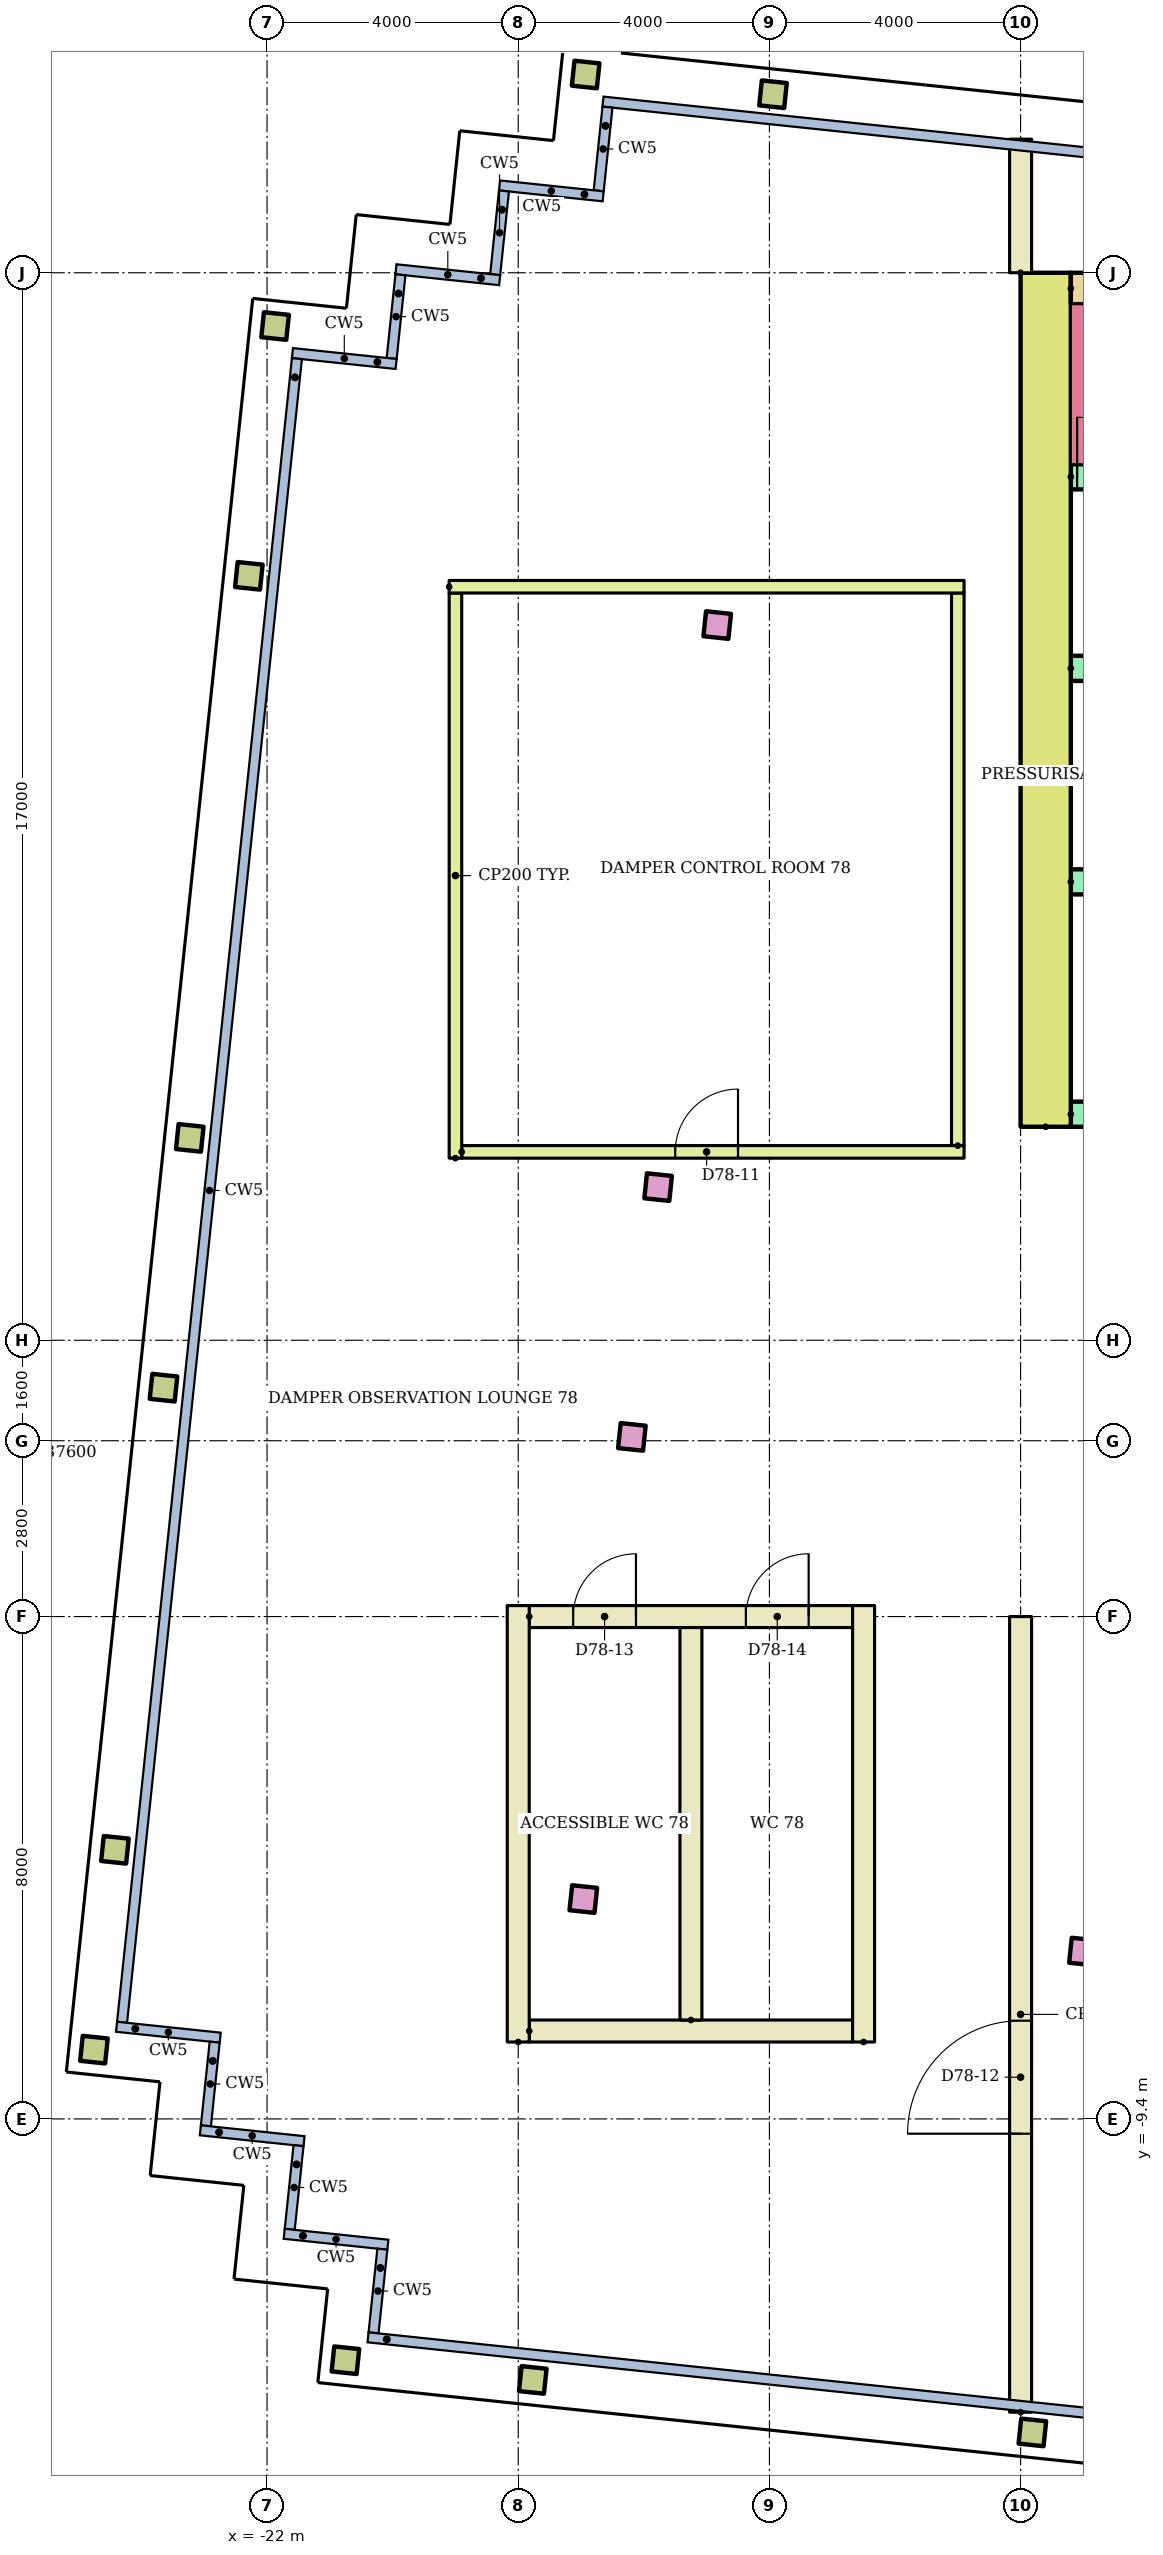
"""IFC4 building model, lengths in metres.
Left out: names, types, materials, properties, quantities, classifications, styles, units other than length and angle.
Written with IfcOpenShell. Run it as: python <this file> out.ifc"""

import sys

from ifc_helpers import new_model, si_unit, direction, frame, frame_2d, origin, origin_2d, place, context, subcontext, project, spatial, rectangle, hollow_rectangle, extrude, element, fill, save


model = new_model("IFC4")
c1 = context("Model", 3, precision=1e-05, world=origin(), true_north=direction((0.0, 1.0)))
c2 = subcontext(c1, "Body", "Model", "MODEL_VIEW")
j1 = project(units=[si_unit("LENGTHUNIT", "METRE"), si_unit("PLANEANGLEUNIT", "RADIAN")], contexts=[c1])
p1 = place(None, origin())
s1 = spatial("IfcSite", under=j1, at=p1, CompositionType="ELEMENT")
p2 = place(p1, origin())
s2 = spatial("IfcBuilding", under=s1, at=p2, CompositionType="ELEMENT")
p3 = place(p2, frame((0.0, 0.0, 301.7)))
s3 = spatial("IfcBuildingStorey", under=s2, at=p3, CompositionType="ELEMENT", Elevation=301.7)
for number, where, z_axis, x_axis in (
    (1, (-20.752, -13.243, 0.0), (0.0, 0.0, 1.0), (0.995, -0.105, 0.0)),
    (2, (-17.768, -13.556, 0.0), (0.0, 0.0, 1.0), (0.995, -0.105, 0.0)),
    (3, (-9.812, -14.392, 0.0), (0.0, 0.0, 1.0), (0.995, -0.105, 0.0)),
    (4, (-24.757, -8.297, 0.0), (0.0, 0.0, 1.0), (0.995, -0.105, 0.0)),
    (5, (-24.423, -5.115, 0.0), (0.0, 0.0, 1.0), (0.995, -0.105, 0.0)),
):
    element("IfcColumn", number, at=place(p3, frame(where, z_axis=z_axis, x_axis=x_axis)), inside=s3, PredefinedType="COLUMN", context=c2, shape_type="SweptSolid", body=[
        extrude(hollow_rectangle(XDim=0.4, YDim=0.4, WallThickness=0.02, at=origin_2d()), origin(), (0.0, 0.0, 1.0), 7.5),
    ])
for number, where, z_axis, x_axis in (
    (6, (-16.964, -5.898, 0.0), (0.0, 0.0, 1.0), (0.995, -0.105, 0.0)),
    (7, (-9.007, -6.735, 0.0), (0.0, 0.0, 1.0), (0.995, -0.105, 0.0)),
):
    element("IfcColumn", number, at=place(p3, frame(where, z_axis=z_axis, x_axis=x_axis)), inside=s3, PredefinedType="COLUMN", context=c2, shape_type="SweptSolid", body=[
        extrude(rectangle(XDim=0.4, YDim=0.4, at=origin_2d()), origin(), (0.0, 0.0, 1.0), 7.5),
    ])
p4 = place(p3, frame((-23.649, 2.245, 0.0), z_axis=(0.0, 0.0, 1.0), x_axis=(0.994521895368, -0.104528463268, 0.0)))
e8 = element("IfcColumn", 8, at=p4, inside=s3, PredefinedType="COLUMN", context=c2, shape_type="SweptSolid", body=[
    extrude(hollow_rectangle(XDim=0.4, YDim=0.4, WallThickness=0.02, at=origin_2d()), origin(), (0.0, 0.0, 1.0), 7.5),
])
p5 = place(p3, frame((-16.19, 1.461, 0.0), z_axis=(0.0, 0.0, 1.0), x_axis=(0.994521895368, -0.104528463268, 0.0)))
e9 = element("IfcColumn", 9, at=p5, inside=s3, PredefinedType="COLUMN", context=c2, shape_type="SweptSolid", body=[
    extrude(rectangle(XDim=0.4, YDim=0.4, at=origin_2d()), origin(), (0.0, 0.0, 1.0), 7.5),
])
p6 = place(p3, frame((-23.231, 6.223, 0.0), z_axis=(0.0, 0.0, 1.0), x_axis=(0.994521895368, -0.104528463268, 0.0)))
e10 = element("IfcColumn", 10, at=p6, inside=s3, PredefinedType="COLUMN", context=c2, shape_type="SweptSolid", body=[
    extrude(hollow_rectangle(XDim=0.4, YDim=0.4, WallThickness=0.02, at=origin_2d()), origin(), (0.0, 0.0, 1.0), 7.5),
])
p7 = place(p3, frame((-15.772, 5.439, 0.0), z_axis=(0.0, 0.0, 1.0), x_axis=(0.994521895368, -0.104528463268, 0.0)))
e11 = element("IfcColumn", 11, at=p7, inside=s3, PredefinedType="COLUMN", context=c2, shape_type="SweptSolid", body=[
    extrude(rectangle(XDim=0.4, YDim=0.4, at=origin_2d()), origin(), (0.0, 0.0, 1.0), 7.5),
])
p8 = place(p3, frame((-22.29, 15.174, 0.0), z_axis=(0.0, 0.0, 1.0), x_axis=(0.994521895368, -0.104528463268, 0.0)))
e12 = element("IfcColumn", 12, at=p8, inside=s3, PredefinedType="COLUMN", context=c2, shape_type="SweptSolid", body=[
    extrude(hollow_rectangle(XDim=0.4, YDim=0.4, WallThickness=0.02, at=origin_2d()), origin(), (0.0, 0.0, 1.0), 7.5),
])
p9 = place(p3, frame((-14.831, 14.39, 0.0), z_axis=(0.0, 0.0, 1.0), x_axis=(0.994521895368, -0.104528463268, 0.0)))
e13 = element("IfcColumn", 13, at=p9, inside=s3, PredefinedType="COLUMN", context=c2, shape_type="SweptSolid", body=[
    extrude(rectangle(XDim=0.4, YDim=0.4, at=origin_2d()), origin(), (0.0, 0.0, 1.0), 7.5),
])
for number, where, z_axis, x_axis in (
    (14, (-21.872, 19.152, 0.0), (0.0, 0.0, 1.0), (0.995, -0.105, 0.0)),
    (15, (-16.926, 23.157, 0.0), (0.0, 0.0, 1.0), (0.995, -0.105, 0.0)),
    (16, (-13.943, 22.843, 0.0), (0.0, 0.0, 1.0), (0.995, -0.105, 0.0)),
):
    element("IfcColumn", number, at=place(p3, frame(where, z_axis=z_axis, x_axis=x_axis)), inside=s3, PredefinedType="COLUMN", context=c2, shape_type="SweptSolid", body=[
        extrude(hollow_rectangle(XDim=0.4, YDim=0.4, WallThickness=0.02, at=origin_2d()), origin(), (0.0, 0.0, 1.0), 7.5),
    ])
p10 = place(p3, frame((-9.6, 6.4, 0.0), z_axis=(0.0, 0.0, 1.0), x_axis=(0.0, 1.0, 0.0)))
e17 = element("IfcWall", 17, at=p10, inside=s3, PredefinedType="SHEAR", context=c2, shape_type="SweptSolid", body=[
    extrude(rectangle(XDim=13.6, YDim=0.8, at=frame_2d((6.8, 0.0))), origin(), (0.0, 0.0, 1.0), 7.08),
])
p11 = place(p3, frame((-9.2, 19.75, 0.0)))
e18 = element("IfcWall", 18, at=p11, inside=s3, PredefinedType="SHEAR", context=c2, shape_type="SweptSolid", body=[
    extrude(rectangle(XDim=18.4, YDim=0.5, at=frame_2d((9.2, 0.0))), origin(), (0.0, 0.0, 1.0), 7.08),
])
p12 = place(p3, frame((-9.2, 6.6, 0.0)))
e19 = element("IfcWall", 19, at=p12, inside=s3, PredefinedType="SHEAR", context=c2, shape_type="SweptSolid", body=[
    extrude(rectangle(XDim=18.4, YDim=0.4, at=frame_2d((9.2, 0.0))), origin(), (0.0, 0.0, 1.0), 7.08),
])
p13 = place(p12, frame((8.3, 0.0, 0.0)))
e20 = element("IfcOpeningElement", 20, at=p13, cuts=e19, PredefinedType="OPENING", context=c2, shape_type="SweptSolid", body=[
    extrude(rectangle(XDim=1.8, YDim=2.1, at=frame_2d((0.9, 1.05))), frame((0.0, 0.21, 0.0), z_axis=(0.0, -1.0, 0.0), x_axis=(1.0, 0.0, 0.0)), (0.0, 0.0, 1.0), 0.42),
])
p14 = place(p12, frame((3.8, 0.0, 0.0)))
e21 = element("IfcOpeningElement", 21, at=p14, cuts=e19, PredefinedType="OPENING", context=c2, shape_type="SweptSolid", body=[
    extrude(rectangle(XDim=1.8, YDim=2.1, at=frame_2d((0.9, 1.05))), frame((0.0, 0.21, 0.0), z_axis=(0.0, -1.0, 0.0), x_axis=(1.0, 0.0, 0.0)), (0.0, 0.0, 1.0), 0.42),
])
p15 = place(p12, frame((12.8, 0.0, 0.0)))
e22 = element("IfcOpeningElement", 22, at=p15, cuts=e19, PredefinedType="OPENING", context=c2, shape_type="SweptSolid", body=[
    extrude(rectangle(XDim=1.8, YDim=2.1, at=frame_2d((0.9, 1.05))), frame((0.0, 0.21, 0.0), z_axis=(0.0, -1.0, 0.0), x_axis=(1.0, 0.0, 0.0)), (0.0, 0.0, 1.0), 0.42),
])
p16 = place(p3, frame((-9.2, 10.3, 0.0)))
e23 = element("IfcWall", 23, at=p16, inside=s3, PredefinedType="SHEAR", context=c2, shape_type="SweptSolid", body=[
    extrude(rectangle(XDim=8.0, YDim=0.4, at=frame_2d((4.0, 0.0))), origin(), (0.0, 0.0, 1.0), 7.08),
])
p17 = place(p16, frame((0.917, 0.0, 0.0)))
e24 = element("IfcOpeningElement", 24, at=p17, cuts=e23, PredefinedType="OPENING", context=c2, shape_type="SweptSolid", body=[
    extrude(rectangle(XDim=1.0, YDim=2.1, at=frame_2d((0.5, 1.05))), frame((0.0, 0.21, 0.0), z_axis=(0.0, -1.0, 0.0), x_axis=(1.0, 0.0, 0.0)), (0.0, 0.0, 1.0), 0.42),
])
p18 = place(p3, frame((-9.2, 13.7, 0.0)))
e25 = element("IfcWall", 25, at=p18, inside=s3, PredefinedType="SHEAR", context=c2, shape_type="SweptSolid", body=[
    extrude(rectangle(XDim=8.0, YDim=0.4, at=frame_2d((4.0, 0.0))), origin(), (0.0, 0.0, 1.0), 7.08),
])
p19 = place(p3, frame((-9.2, 16.75, 0.0)))
e26 = element("IfcWall", 26, at=p19, inside=s3, PredefinedType="SHEAR", context=c2, shape_type="SweptSolid", body=[
    extrude(rectangle(XDim=18.4, YDim=0.4, at=frame_2d((9.2, 0.0))), origin(), (0.0, 0.0, 1.0), 7.08),
])
p20 = place(p19, frame((0.1, 0.0, 0.0)))
e27 = element("IfcOpeningElement", 27, at=p20, cuts=e26, PredefinedType="OPENING", context=c2, shape_type="SweptSolid", body=[
    extrude(rectangle(XDim=0.95, YDim=2.1, at=frame_2d((0.475, 1.05))), frame((0.0, 0.21, 0.0), z_axis=(0.0, -1.0, 0.0), x_axis=(1.0, 0.0, 0.0)), (0.0, 0.0, 1.0), 0.42),
])
p21 = place(p19, frame((6.1, 0.0, 0.0)))
e28 = element("IfcOpeningElement", 28, at=p21, cuts=e26, PredefinedType="OPENING", context=c2, shape_type="SweptSolid", body=[
    extrude(rectangle(XDim=0.95, YDim=2.1, at=frame_2d((0.475, 1.05))), frame((0.0, 0.21, 0.0), z_axis=(0.0, -1.0, 0.0), x_axis=(1.0, 0.0, 0.0)), (0.0, 0.0, 1.0), 0.42),
])
p22 = place(p19, frame((12.1, 0.0, 0.0)))
e29 = element("IfcOpeningElement", 29, at=p22, cuts=e26, PredefinedType="OPENING", context=c2, shape_type="SweptSolid", body=[
    extrude(rectangle(XDim=0.95, YDim=2.1, at=frame_2d((0.475, 1.05))), frame((0.0, 0.21, 0.0), z_axis=(0.0, -1.0, 0.0), x_axis=(1.0, 0.0, 0.0)), (0.0, 0.0, 1.0), 0.42),
])
p23 = place(p3, frame((-11.0, 6.1, 0.0), z_axis=(0.0, 0.0, 1.0), x_axis=(0.0, 1.0, 0.0)))
e30 = element("IfcWall", 30, at=p23, inside=s3, PredefinedType="PARTITIONING", context=c2, shape_type="SweptSolid", body=[
    extrude(rectangle(XDim=8.8, YDim=0.2, at=frame_2d((4.4, 0.0))), origin(), (0.0, 0.0, 1.0), 7.08),
])
p24 = place(p3, frame((-18.9, 6.0, 0.0)))
e31 = element("IfcWall", 31, at=p24, inside=s3, PredefinedType="PARTITIONING", context=c2, shape_type="SweptSolid", body=[
    extrude(rectangle(XDim=8.0, YDim=0.2, at=frame_2d((4.0, 0.0))), origin(), (0.0, 0.0, 1.0), 7.08),
])
p25 = place(p24, frame((3.4, 0.0, 0.0)))
e32 = element("IfcOpeningElement", 32, at=p25, cuts=e31, PredefinedType="OPENING", context=c2, shape_type="SweptSolid", body=[
    extrude(rectangle(XDim=1.0, YDim=2.1, at=frame_2d((0.5, 1.05))), frame((0.0, 0.11, 0.0), z_axis=(0.0, -1.0, 0.0), x_axis=(1.0, 0.0, 0.0)), (0.0, 0.0, 1.0), 0.22),
])
p26 = place(p3, frame((-19.0, 5.9, 0.0), z_axis=(0.0, 0.0, 1.0), x_axis=(0.0, 1.0, 0.0)))
e33 = element("IfcWall", 33, at=p26, inside=s3, PredefinedType="PARTITIONING", context=c2, shape_type="SweptSolid", body=[
    extrude(rectangle(XDim=9.0, YDim=0.2, at=frame_2d((4.5, 0.0))), origin(), (0.0, 0.0, 1.0), 7.08),
])
p27 = place(p3, frame((-19.1, 15.0, 0.0)))
e34 = element("IfcWall", 34, at=p27, inside=s3, PredefinedType="PARTITIONING", context=c2, shape_type="SweptSolid", body=[
    extrude(rectangle(XDim=8.2, YDim=0.2, at=frame_2d((4.1, 0.0))), origin(), (0.0, 0.0, 1.0), 7.08),
])
p28 = place(p3, frame((-10.0, -14.071, 0.0), z_axis=(0.0, 0.0, 1.0), x_axis=(0.0, 1.0, 0.0)))
e35 = element("IfcWall", 35, at=p28, inside=s3, PredefinedType="PARTITIONING", context=c2, shape_type="SweptSolid", body=[
    extrude(rectangle(XDim=12.671, YDim=0.35, at=frame_2d((6.335, 0.0))), origin(), (0.0, 0.0, 1.0), 7.08),
])
p29 = place(p28, frame((4.436, 0.0, 0.0)))
e36 = element("IfcOpeningElement", 36, at=p29, cuts=e35, PredefinedType="OPENING", context=c2, shape_type="SweptSolid", body=[
    extrude(rectangle(XDim=1.8, YDim=2.1, at=frame_2d((0.9, 1.05))), frame((0.0, 0.185, 0.0), z_axis=(0.0, -1.0, 0.0), x_axis=(1.0, 0.0, 0.0)), (0.0, 0.0, 1.0), 0.37),
])
p30 = place(p3, frame((-10.0, 20.0, 0.0), z_axis=(0.0, 0.0, 1.0), x_axis=(0.0, 1.0, 0.0)))
e37 = element("IfcWall", 37, at=p30, inside=s3, PredefinedType="PARTITIONING", context=c2, shape_type="SweptSolid", body=[
    extrude(rectangle(XDim=2.127, YDim=0.35, at=frame_2d((1.063, 0.0))), origin(), (0.0, 0.0, 1.0), 7.08),
])
p31 = place(p3, frame((-17.825, -1.4, 0.0)))
e38 = element("IfcWall", 38, at=p31, inside=s3, PredefinedType="PARTITIONING", context=c2, shape_type="SweptSolid", body=[
    extrude(rectangle(XDim=5.15, YDim=0.35, at=frame_2d((2.575, 0.0))), origin(), (0.0, 0.0, 1.0), 7.08),
])
p32 = place(p31, frame((0.7, 0.0, 0.0)))
e39 = element("IfcOpeningElement", 39, at=p32, cuts=e38, PredefinedType="OPENING", context=c2, shape_type="SweptSolid", body=[
    extrude(rectangle(XDim=1.0, YDim=2.1, at=frame_2d((0.5, 1.05))), frame((0.0, 0.185, 0.0), z_axis=(0.0, -1.0, 0.0), x_axis=(1.0, 0.0, 0.0)), (0.0, 0.0, 1.0), 0.37),
])
p33 = place(p31, frame((3.45, 0.0, 0.0)))
e40 = element("IfcOpeningElement", 40, at=p33, cuts=e38, PredefinedType="OPENING", context=c2, shape_type="SweptSolid", body=[
    extrude(rectangle(XDim=1.0, YDim=2.1, at=frame_2d((0.5, 1.05))), frame((0.0, 0.185, 0.0), z_axis=(0.0, -1.0, 0.0), x_axis=(1.0, 0.0, 0.0)), (0.0, 0.0, 1.0), 0.37),
])
p34 = place(p3, frame((-17.825, -8.0, 0.0)))
e41 = element("IfcWall", 41, at=p34, inside=s3, PredefinedType="PARTITIONING", context=c2, shape_type="SweptSolid", body=[
    extrude(rectangle(XDim=5.15, YDim=0.35, at=frame_2d((2.575, 0.0))), origin(), (0.0, 0.0, 1.0), 7.08),
])
for number, where, z_axis, x_axis in (
    (42, (-18.0, -8.175, 0.0), (0.0, 0.0, 1.0), (0.0, 1.0, 0.0)),
    (43, (-12.5, -8.175, 0.0), (0.0, 0.0, 1.0), (0.0, 1.0, 0.0)),
):
    element("IfcWall", number, at=place(p3, frame(where, z_axis=z_axis, x_axis=x_axis)), inside=s3, PredefinedType="PARTITIONING", context=c2, shape_type="SweptSolid", body=[
        extrude(rectangle(XDim=6.95, YDim=0.35, at=frame_2d((3.475, 0.0))), origin(), (0.0, 0.0, 1.0), 7.08),
    ])
p35 = place(p3, frame((-15.25, -7.825, 0.0), z_axis=(0.0, 0.0, 1.0), x_axis=(0.0, 1.0, 0.0)))
e44 = element("IfcWall", 44, at=p35, inside=s3, PredefinedType="PARTITIONING", context=c2, shape_type="SweptSolid", body=[
    extrude(rectangle(XDim=6.25, YDim=0.35, at=frame_2d((3.125, 0.0))), origin(), (0.0, 0.0, 1.0), 7.08),
])
p36 = place(p20, origin())
e45 = element("IfcDoor", 45, at=p36, inside=s3, OperationType="SINGLE_SWING_LEFT", PredefinedType="DOOR", context=c2, shape_type="SweptSolid", body=[
    extrude(rectangle(XDim=0.95, YDim=2.1, at=frame_2d((0.475, 1.05))), frame((0.0, 0.025, 0.0), z_axis=(0.0, -1.0, 0.0), x_axis=(1.0, 0.0, 0.0)), (0.0, 0.0, 1.0), 0.05),
])
fill(e27, e45)
p37 = place(p25, origin())
e46 = element("IfcDoor", 46, at=p37, inside=s3, OperationType="SINGLE_SWING_RIGHT", PredefinedType="DOOR", context=c2, shape_type="SweptSolid", body=[
    extrude(rectangle(XDim=1.0, YDim=2.1, at=frame_2d((0.5, 1.05))), frame((0.0, 0.025, 0.0), z_axis=(0.0, -1.0, 0.0), x_axis=(1.0, 0.0, 0.0)), (0.0, 0.0, 1.0), 0.05),
])
fill(e32, e46)
p38 = place(p29, origin())
e47 = element("IfcDoor", 47, at=p38, inside=s3, OperationType="SINGLE_SWING_LEFT", PredefinedType="DOOR", context=c2, shape_type="SweptSolid", body=[
    extrude(rectangle(XDim=1.8, YDim=2.1, at=frame_2d((0.9, 1.05))), frame((0.0, 0.025, 0.0), z_axis=(0.0, -1.0, 0.0), x_axis=(1.0, 0.0, 0.0)), (0.0, 0.0, 1.0), 0.05),
])
fill(e36, e47)
p39 = place(p32, origin())
e48 = element("IfcDoor", 48, at=p39, inside=s3, OperationType="SINGLE_SWING_RIGHT", PredefinedType="DOOR", context=c2, shape_type="SweptSolid", body=[
    extrude(rectangle(XDim=1.0, YDim=2.1, at=frame_2d((0.5, 1.05))), frame((0.0, 0.025, 0.0), z_axis=(0.0, -1.0, 0.0), x_axis=(1.0, 0.0, 0.0)), (0.0, 0.0, 1.0), 0.05),
])
fill(e39, e48)
p40 = place(p33, origin())
e49 = element("IfcDoor", 49, at=p40, inside=s3, OperationType="SINGLE_SWING_RIGHT", PredefinedType="DOOR", context=c2, shape_type="SweptSolid", body=[
    extrude(rectangle(XDim=1.0, YDim=2.1, at=frame_2d((0.5, 1.05))), frame((0.0, 0.025, 0.0), z_axis=(0.0, -1.0, 0.0), x_axis=(1.0, 0.0, 0.0)), (0.0, 0.0, 1.0), 0.05),
])
fill(e40, e49)
save(model, sys.argv[1])
